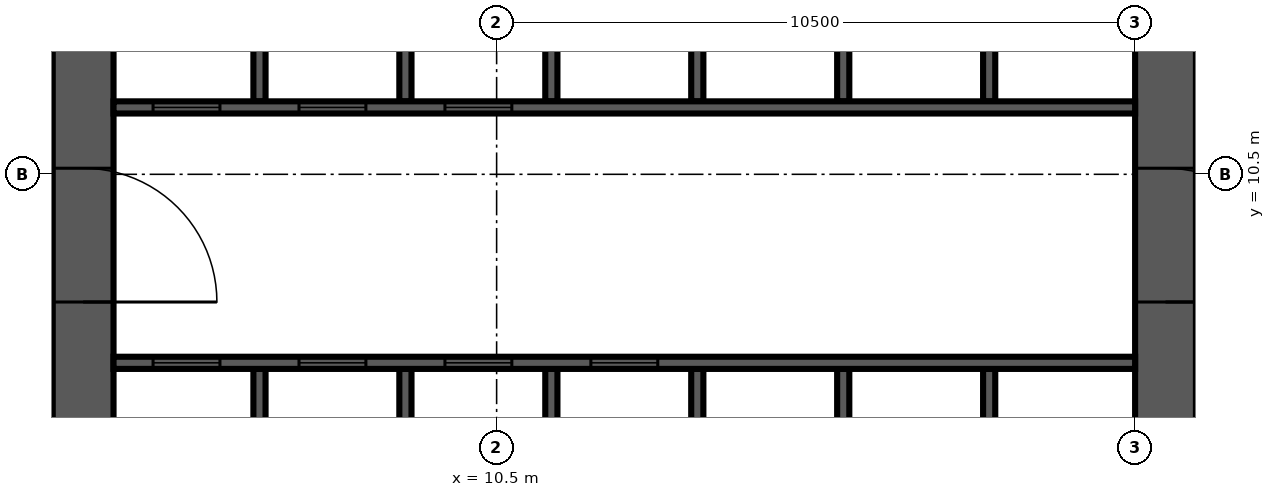
"""IFC4 building model, lengths in metres.
Left out: names, types, materials, properties, quantities, classifications, styles, units other than length and angle.
Written with IfcOpenShell. Run it as: python <this file> out.ifc"""

import sys

from ifc_helpers import new_model, si_unit, direction, frame, frame_2d, origin, place, context, subcontext, project, spatial, rectangle, extrude, source, transform, mapped, element, fill, save


model = new_model("IFC4")
c1 = context("Model", 3, precision=1e-05, world=origin(), true_north=direction((0.0, 1.0)))
c2 = subcontext(c1, "Body", "Model", "MODEL_VIEW")
j1 = project(units=[si_unit("LENGTHUNIT", "METRE"), si_unit("PLANEANGLEUNIT", "RADIAN")], contexts=[c1])
p1 = place(None, origin())
s1 = spatial("IfcSite", under=j1, at=p1, CompositionType="ELEMENT")
p2 = place(p1, origin())
s2 = spatial("IfcBuilding", under=s1, at=p2, CompositionType="ELEMENT")
p3 = place(p2, frame((0.0, 0.0, 116.1)))
s3 = spatial("IfcBuildingStorey", under=s2, at=p3, CompositionType="ELEMENT", Elevation=116.1)
m1 = source(origin(), c2, "Body", "SweptSolid", [
    extrude(rectangle(XDim=17.8, YDim=1.0, at=frame_2d((8.9, 0.0))), origin(), (0.0, 0.0, 1.0), 4.2),
])
p4 = place(p3, frame((3.7, 4.2, 0.0), z_axis=(0.0, 0.0, 1.0), x_axis=(0.0, 1.0, 0.0)))
e1 = element("IfcWall", 1, at=p4, inside=s3, PredefinedType="SHEAR", context=c2, shape_type="MappedRepresentation", body=[
    mapped(m1, transform((0.0, 0.0, 0.0), scale=1.0)),
])
m2 = source(origin(), c2, "Body", "SweptSolid", [
    extrude(rectangle(XDim=2.2, YDim=2.1, at=frame_2d((1.1, 1.05))), frame((0.0, 0.51, 0.0), z_axis=(0.0, -1.0, 0.0), x_axis=(1.0, 0.0, 0.0)), (0.0, 0.0, 1.0), 1.02),
])
p5 = place(p4, frame((4.2, 0.0, 0.0)))
e2 = element("IfcOpeningElement", 2, at=p5, cuts=e1, PredefinedType="OPENING", context=c2, shape_type="MappedRepresentation", body=[
    mapped(m2, transform((0.0, 0.0, 0.0), scale=1.0)),
])
m3 = source(origin(), c2, "Body", "SweptSolid", [
    extrude(rectangle(XDim=0.9, YDim=2.1, at=frame_2d((0.45, 1.05))), frame((0.0, 0.51, 0.0), z_axis=(0.0, -1.0, 0.0), x_axis=(1.0, 0.0, 0.0)), (0.0, 0.0, 1.0), 1.02),
])
p6 = place(p4, frame((10.95, 0.0, 0.0)))
e3 = element("IfcOpeningElement", 3, at=p6, cuts=e1, PredefinedType="OPENING", context=c2, shape_type="MappedRepresentation", body=[
    mapped(m3, transform((0.0, 0.0, 0.0), scale=1.0)),
])
m4 = source(origin(), c2, "Body", "SweptSolid", [
    extrude(rectangle(XDim=16.8, YDim=1.0, at=frame_2d((8.4, 0.0))), origin(), (0.0, 0.0, 1.0), 4.2),
])
p7 = place(p3, frame((21.5, 4.2, 0.0), z_axis=(0.0, 0.0, 1.0), x_axis=(0.0, 1.0, 0.0)))
e4 = element("IfcWall", 4, at=p7, inside=s3, PredefinedType="SHEAR", context=c2, shape_type="MappedRepresentation", body=[
    mapped(m4, transform((0.0, 0.0, 0.0), scale=1.0)),
])
p8 = place(p7, frame((4.2, 0.0, 0.0)))
e5 = element("IfcOpeningElement", 5, at=p8, cuts=e4, PredefinedType="OPENING", context=c2, shape_type="MappedRepresentation", body=[
    mapped(m2, transform((0.0, 0.0, 0.0), scale=1.0)),
])
m5 = source(origin(), c2, "Body", "SweptSolid", [
    extrude(rectangle(XDim=1.2, YDim=2.1, at=frame_2d((0.6, 1.05))), frame((0.0, 0.51, 0.0), z_axis=(0.0, -1.0, 0.0), x_axis=(1.0, 0.0, 0.0)), (0.0, 0.0, 1.0), 1.02),
])
p9 = place(p7, frame((14.7, 0.0, 0.0)))
e6 = element("IfcOpeningElement", 6, at=p9, cuts=e4, PredefinedType="OPENING", context=c2, shape_type="MappedRepresentation", body=[
    mapped(m5, transform((0.0, 0.0, 0.0), scale=1.0)),
])
m6 = source(origin(), c2, "Body", "SweptSolid", [
    extrude(rectangle(XDim=3.1, YDim=0.2, at=frame_2d((1.55, 0.0))), origin(), (0.0, 0.0, 1.0), 4.2),
])
for number, where, z_axis, x_axis in (
    (7, (6.6, 4.2, 0.0), (0.0, 0.0, 1.0), (0.0, 1.0, 0.0)),
    (8, (9.0, 4.2, 0.0), (0.0, 0.0, 1.0), (0.0, 1.0, 0.0)),
    (9, (11.4, 4.2, 0.0), (0.0, 0.0, 1.0), (0.0, 1.0, 0.0)),
    (10, (13.8, 4.2, 0.0), (0.0, 0.0, 1.0), (0.0, 1.0, 0.0)),
    (11, (16.2, 4.2, 0.0), (0.0, 0.0, 1.0), (0.0, 1.0, 0.0)),
    (12, (18.6, 4.2, 0.0), (0.0, 0.0, 1.0), (0.0, 1.0, 0.0)),
):
    element("IfcWall", number, at=place(p3, frame(where, z_axis=z_axis, x_axis=x_axis)), inside=s3, PredefinedType="SOLIDWALL", context=c2, shape_type="MappedRepresentation", body=[
        mapped(m6, transform((0.0, 0.0, 0.0), scale=1.0)),
    ])
m7 = source(origin(), c2, "Body", "SweptSolid", [
    extrude(rectangle(XDim=3.0, YDim=0.2, at=frame_2d((1.5, 0.0))), origin(), (0.0, 0.0, 1.0), 4.2),
])
for number, where, z_axis, x_axis in (
    (13, (6.6, 11.7, 0.0), (0.0, 0.0, 1.0), (0.0, 1.0, 0.0)),
    (14, (9.0, 11.7, 0.0), (0.0, 0.0, 1.0), (0.0, 1.0, 0.0)),
    (15, (11.4, 11.7, 0.0), (0.0, 0.0, 1.0), (0.0, 1.0, 0.0)),
    (16, (13.8, 11.7, 0.0), (0.0, 0.0, 1.0), (0.0, 1.0, 0.0)),
    (17, (16.2, 11.7, 0.0), (0.0, 0.0, 1.0), (0.0, 1.0, 0.0)),
    (18, (18.6, 11.7, 0.0), (0.0, 0.0, 1.0), (0.0, 1.0, 0.0)),
):
    element("IfcWall", number, at=place(p3, frame(where, z_axis=z_axis, x_axis=x_axis)), inside=s3, PredefinedType="SOLIDWALL", context=c2, shape_type="MappedRepresentation", body=[
        mapped(m7, transform((0.0, 0.0, 0.0), scale=1.0)),
    ])
m8 = source(origin(), c2, "Body", "SweptSolid", [
    extrude(rectangle(XDim=16.8, YDim=0.2, at=frame_2d((8.4, 0.0))), origin(), (0.0, 0.0, 1.0), 4.2),
])
p10 = place(p3, frame((4.2, 7.4, 0.0), z_axis=(0.0, 0.0, 1.0), x_axis=(1.0, 0.0, 0.0)))
e19 = element("IfcWall", 19, at=p10, inside=s3, PredefinedType="SOLIDWALL", context=c2, shape_type="MappedRepresentation", body=[
    mapped(m8, transform((0.0, 0.0, 0.0), scale=1.0)),
])
m9 = source(origin(), c2, "Body", "SweptSolid", [
    extrude(rectangle(XDim=1.1, YDim=2.1, at=frame_2d((0.55, 1.05))), frame((0.0, 0.11, 0.0), z_axis=(0.0, -1.0, 0.0), x_axis=(1.0, 0.0, 0.0)), (0.0, 0.0, 1.0), 0.22),
])
p11 = place(p10, frame((0.65, 0.0, 0.0)))
e20 = element("IfcOpeningElement", 20, at=p11, cuts=e19, PredefinedType="OPENING", context=c2, shape_type="MappedRepresentation", body=[
    mapped(m9, transform((0.0, 0.0, 0.0), scale=1.0)),
])
p12 = place(p10, frame((3.05, 0.0, 0.0)))
e21 = element("IfcOpeningElement", 21, at=p12, cuts=e19, PredefinedType="OPENING", context=c2, shape_type="MappedRepresentation", body=[
    mapped(m9, transform((0.0, 0.0, 0.0), scale=1.0)),
])
p13 = place(p10, frame((5.45, 0.0, 0.0)))
e22 = element("IfcOpeningElement", 22, at=p13, cuts=e19, PredefinedType="OPENING", context=c2, shape_type="MappedRepresentation", body=[
    mapped(m9, transform((0.0, 0.0, 0.0), scale=1.0)),
])
p14 = place(p10, frame((7.85, 0.0, 0.0)))
e23 = element("IfcOpeningElement", 23, at=p14, cuts=e19, PredefinedType="OPENING", context=c2, shape_type="MappedRepresentation", body=[
    mapped(m9, transform((0.0, 0.0, 0.0), scale=1.0)),
])
p15 = place(p3, frame((4.2, 11.6, 0.0), z_axis=(0.0, 0.0, 1.0), x_axis=(1.0, 0.0, 0.0)))
e24 = element("IfcWall", 24, at=p15, inside=s3, PredefinedType="SOLIDWALL", context=c2, shape_type="MappedRepresentation", body=[
    mapped(m8, transform((0.0, 0.0, 0.0), scale=1.0)),
])
p16 = place(p15, frame((0.65, 0.0, 0.0)))
e25 = element("IfcOpeningElement", 25, at=p16, cuts=e24, PredefinedType="OPENING", context=c2, shape_type="MappedRepresentation", body=[
    mapped(m9, transform((0.0, 0.0, 0.0), scale=1.0)),
])
p17 = place(p15, frame((3.05, 0.0, 0.0)))
e26 = element("IfcOpeningElement", 26, at=p17, cuts=e24, PredefinedType="OPENING", context=c2, shape_type="MappedRepresentation", body=[
    mapped(m9, transform((0.0, 0.0, 0.0), scale=1.0)),
])
p18 = place(p15, frame((5.45, 0.0, 0.0)))
e27 = element("IfcOpeningElement", 27, at=p18, cuts=e24, PredefinedType="OPENING", context=c2, shape_type="MappedRepresentation", body=[
    mapped(m9, transform((0.0, 0.0, 0.0), scale=1.0)),
])
m10 = source(origin(), c2, "Body", "SweptSolid", [
    extrude(rectangle(XDim=1.1, YDim=2.1, at=frame_2d((0.55, 1.05))), frame((0.0, 0.025, 0.0), z_axis=(0.0, -1.0, 0.0), x_axis=(1.0, 0.0, 0.0)), (0.0, 0.0, 1.0), 0.05),
])
p19 = place(p11, origin())
e28 = element("IfcDoor", 28, at=p19, inside=s3, OperationType="SLIDING_TO_LEFT", PredefinedType="DOOR", context=c2, shape_type="MappedRepresentation", body=[
    mapped(m10, transform((0.0, 0.0, 0.0), scale=1.0)),
])
fill(e20, e28)
p20 = place(p12, origin())
e29 = element("IfcDoor", 29, at=p20, inside=s3, OperationType="SLIDING_TO_LEFT", PredefinedType="DOOR", context=c2, shape_type="MappedRepresentation", body=[
    mapped(m10, transform((0.0, 0.0, 0.0), scale=1.0)),
])
fill(e21, e29)
p21 = place(p13, origin())
e30 = element("IfcDoor", 30, at=p21, inside=s3, OperationType="SLIDING_TO_LEFT", PredefinedType="DOOR", context=c2, shape_type="MappedRepresentation", body=[
    mapped(m10, transform((0.0, 0.0, 0.0), scale=1.0)),
])
fill(e22, e30)
p22 = place(p14, origin())
e31 = element("IfcDoor", 31, at=p22, inside=s3, OperationType="SLIDING_TO_LEFT", PredefinedType="DOOR", context=c2, shape_type="MappedRepresentation", body=[
    mapped(m10, transform((0.0, 0.0, 0.0), scale=1.0)),
])
fill(e23, e31)
p23 = place(p16, origin())
e32 = element("IfcDoor", 32, at=p23, inside=s3, OperationType="SLIDING_TO_LEFT", PredefinedType="DOOR", context=c2, shape_type="MappedRepresentation", body=[
    mapped(m10, transform((0.0, 0.0, 0.0), scale=1.0)),
])
fill(e25, e32)
p24 = place(p17, origin())
e33 = element("IfcDoor", 33, at=p24, inside=s3, OperationType="SLIDING_TO_LEFT", PredefinedType="DOOR", context=c2, shape_type="MappedRepresentation", body=[
    mapped(m10, transform((0.0, 0.0, 0.0), scale=1.0)),
])
fill(e26, e33)
p25 = place(p18, origin())
e34 = element("IfcDoor", 34, at=p25, inside=s3, OperationType="SLIDING_TO_LEFT", PredefinedType="DOOR", context=c2, shape_type="MappedRepresentation", body=[
    mapped(m10, transform((0.0, 0.0, 0.0), scale=1.0)),
])
fill(e27, e34)
m11 = source(origin(), c2, "Body", "SweptSolid", [
    extrude(rectangle(XDim=2.2, YDim=2.1, at=frame_2d((1.1, 1.05))), frame((0.0, 0.025, 0.0), z_axis=(0.0, -1.0, 0.0), x_axis=(1.0, 0.0, 0.0)), (0.0, 0.0, 1.0), 0.05),
])
p26 = place(p8, origin())
e35 = element("IfcDoor", 35, at=p26, inside=s3, OperationType="DOUBLE_DOOR_SINGLE_SWING", PredefinedType="DOOR", context=c2, shape_type="MappedRepresentation", body=[
    mapped(m11, transform((0.0, 0.0, 0.0), scale=1.0)),
])
fill(e5, e35)
p27 = place(p5, origin())
e36 = element("IfcDoor", 36, at=p27, inside=s3, OperationType="DOUBLE_DOOR_SINGLE_SWING", PredefinedType="DOOR", context=c2, shape_type="MappedRepresentation", body=[
    mapped(m11, transform((0.0, 0.0, 0.0), scale=1.0)),
])
fill(e2, e36)
save(model, sys.argv[1])
